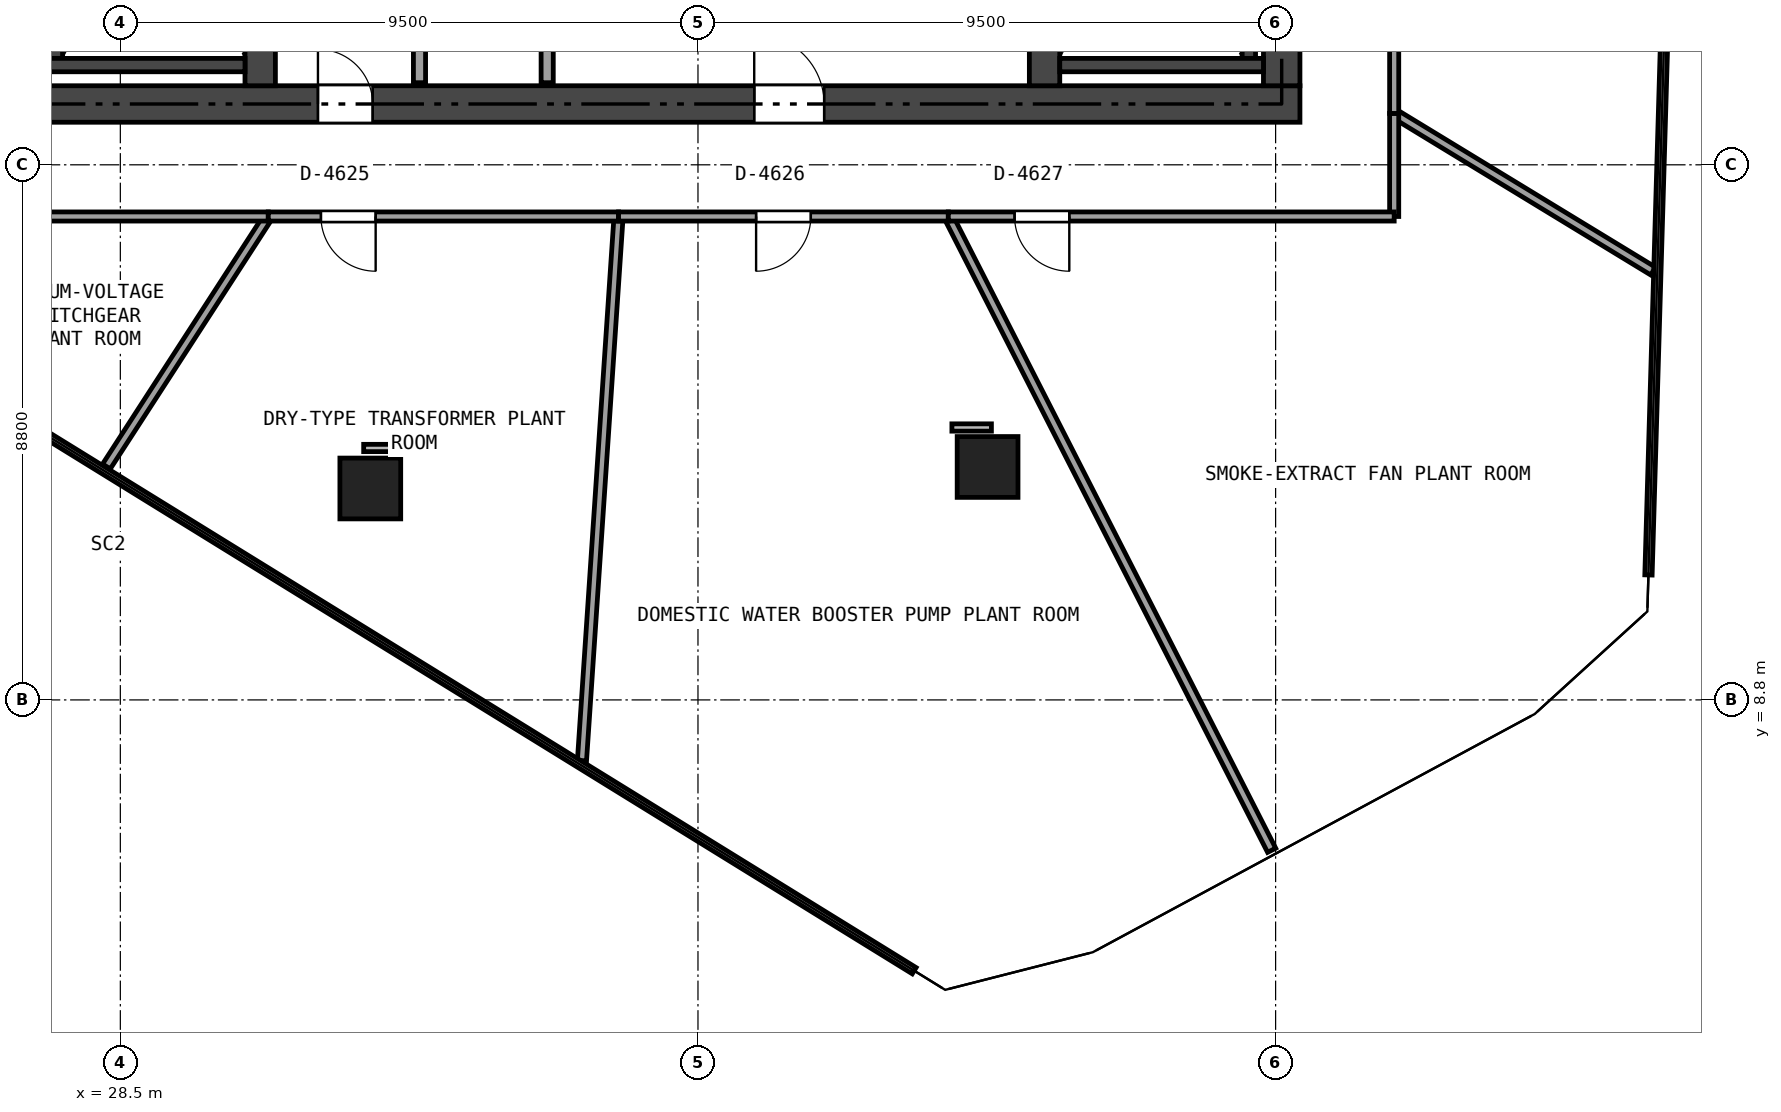
"""IFC4 building model, lengths in metres.
Left out: names, types, materials, properties, quantities, classifications, styles, units other than length and angle.
Written with IfcOpenShell. Run it as: python <this file> out.ifc"""

import sys

from ifc_helpers import new_model, si_unit, direction, frame, frame_2d, origin, origin_2d, place, context, subcontext, project, spatial, rectangle, extrude, element, fill, save


model = new_model("IFC4")
c1 = context("Model", 3, precision=1e-05, world=origin(), true_north=direction((0.0, 1.0)))
c2 = subcontext(c1, "Body", "Model", "MODEL_VIEW")
j1 = project(units=[si_unit("LENGTHUNIT", "METRE"), si_unit("PLANEANGLEUNIT", "RADIAN")], contexts=[c1])
p1 = place(None, origin())
s1 = spatial("IfcSite", under=j1, at=p1, CompositionType="ELEMENT")
p2 = place(p1, origin())
s2 = spatial("IfcBuilding", under=s1, at=p2, CompositionType="ELEMENT")
p3 = place(p2, frame((0.0, 0.0, 172.5)))
s3 = spatial("IfcBuildingStorey", under=s2, at=p3, CompositionType="ELEMENT", Elevation=172.5)
p4 = place(p3, frame((26.5, 18.6, 0.0), z_axis=(0.0, 0.0, 1.0), x_axis=(1.0, 0.0, 0.0)))
e1 = element("IfcWall", 1, at=p4, inside=s3, PredefinedType="SHEAR", context=c2, shape_type="SweptSolid", body=[
    extrude(rectangle(XDim=21.4, YDim=0.6, at=frame_2d((10.7, 0.0))), origin(), (0.0, 0.0, 1.0), 4.08),
])
p5 = place(p4, frame((12.425, 0.0, 0.0)))
e2 = element("IfcOpeningElement", 2, at=p5, cuts=e1, PredefinedType="OPENING", context=c2, shape_type="SweptSolid", body=[
    extrude(rectangle(XDim=1.15, YDim=2.15, at=frame_2d((0.575, 1.075))), frame((0.0, 0.31, 0.0), z_axis=(0.0, -1.0, 0.0), x_axis=(1.0, 0.0, 0.0)), (0.0, 0.0, 1.0), 0.62),
])
p6 = place(p4, frame((5.25, 0.0, 0.0)))
e3 = element("IfcOpeningElement", 3, at=p6, cuts=e1, PredefinedType="OPENING", context=c2, shape_type="SweptSolid", body=[
    extrude(rectangle(XDim=0.9, YDim=2.1, at=frame_2d((0.45, 1.05))), frame((0.0, 0.31, 0.0), z_axis=(0.0, -1.0, 0.0), x_axis=(1.0, 0.0, 0.0)), (0.0, 0.0, 1.0), 0.62),
])
p7 = place(p3, frame((47.6, 18.9, 0.0), z_axis=(0.0, 0.0, 1.0), x_axis=(0.0, 1.0, 0.0)))
e4 = element("IfcWall", 4, at=p7, inside=s3, PredefinedType="SHEAR", context=c2, shape_type="SweptSolid", body=[
    extrude(rectangle(XDim=15.0, YDim=0.6, at=frame_2d((7.5, 0.0))), origin(), (0.0, 0.0, 1.0), 4.08),
])
p8 = place(p7, frame((6.6, 0.0, 0.0)))
e5 = element("IfcOpeningElement", 5, at=p8, cuts=e4, PredefinedType="OPENING", context=c2, shape_type="SweptSolid", body=[
    extrude(rectangle(XDim=1.1, YDim=2.15, at=frame_2d((0.55, 1.075))), frame((0.0, 0.31, 0.0), z_axis=(0.0, -1.0, 0.0), x_axis=(1.0, 0.0, 0.0)), (0.0, 0.0, 1.0), 0.62),
])
p9 = place(p7, frame((8.5, 0.0, 0.0)))
e6 = element("IfcOpeningElement", 6, at=p9, cuts=e4, PredefinedType="OPENING", context=c2, shape_type="SweptSolid", body=[
    extrude(rectangle(XDim=0.9, YDim=2.1, at=frame_2d((0.45, 1.05))), frame((0.0, 0.31, 0.0), z_axis=(0.0, -1.0, 0.0), x_axis=(1.0, 0.0, 0.0)), (0.0, 0.0, 1.0), 0.62),
])
p10 = place(p7, frame((13.15, 0.0, 0.0)))
e7 = element("IfcOpeningElement", 7, at=p10, cuts=e4, PredefinedType="OPENING", context=c2, shape_type="SweptSolid", body=[
    extrude(rectangle(XDim=0.9, YDim=2.1, at=frame_2d((0.45, 1.05))), frame((0.0, 0.31, 0.0), z_axis=(0.0, -1.0, 0.0), x_axis=(1.0, 0.0, 0.0)), (0.0, 0.0, 1.0), 0.62),
])
p11 = place(p3, frame((30.8, 18.9, 0.0), z_axis=(0.0, 0.0, 1.0), x_axis=(0.0, 1.0, 0.0)))
e8 = element("IfcWall", 8, at=p11, inside=s3, PredefinedType="SHEAR", context=c2, shape_type="SweptSolid", body=[
    extrude(rectangle(XDim=15.0, YDim=0.5, at=frame_2d((7.5, 0.0))), origin(), (0.0, 0.0, 1.0), 4.08),
])
p12 = place(p11, frame((6.6, 0.0, 0.0)))
e9 = element("IfcOpeningElement", 9, at=p12, cuts=e8, PredefinedType="OPENING", context=c2, shape_type="SweptSolid", body=[
    extrude(rectangle(XDim=1.1, YDim=2.15, at=frame_2d((0.55, 1.075))), frame((0.0, 0.26, 0.0), z_axis=(0.0, -1.0, 0.0), x_axis=(1.0, 0.0, 0.0)), (0.0, 0.0, 1.0), 0.52),
])
p13 = place(p11, frame((8.4, 0.0, 0.0)))
e10 = element("IfcOpeningElement", 10, at=p13, cuts=e8, PredefinedType="OPENING", context=c2, shape_type="SweptSolid", body=[
    extrude(rectangle(XDim=0.9, YDim=2.1, at=frame_2d((0.45, 1.05))), frame((0.0, 0.26, 0.0), z_axis=(0.0, -1.0, 0.0), x_axis=(1.0, 0.0, 0.0)), (0.0, 0.0, 1.0), 0.52),
])
p14 = place(p3, frame((43.7, 18.9, 0.0), z_axis=(0.0, 0.0, 1.0), x_axis=(0.0, 1.0, 0.0)))
e11 = element("IfcWall", 11, at=p14, inside=s3, PredefinedType="SHEAR", context=c2, shape_type="SweptSolid", body=[
    extrude(rectangle(XDim=15.0, YDim=0.5, at=frame_2d((7.5, 0.0))), origin(), (0.0, 0.0, 1.0), 4.08),
])
p15 = place(p14, frame((8.1, 0.0, 0.0)))
e12 = element("IfcOpeningElement", 12, at=p15, cuts=e11, PredefinedType="OPENING", context=c2, shape_type="SweptSolid", body=[
    extrude(rectangle(XDim=0.9, YDim=2.1, at=frame_2d((0.45, 1.05))), frame((0.0, 0.26, 0.0), z_axis=(0.0, -1.0, 0.0), x_axis=(1.0, 0.0, 0.0)), (0.0, 0.0, 1.0), 0.52),
])
p16 = place(p3, frame((27.44, 19.35, 0.0), z_axis=(0.0, 0.0, 1.0), x_axis=(0.0, 1.0, 0.0)))
e13 = element("IfcWall", 13, at=p16, inside=s3, PredefinedType="SHEAR", context=c2, shape_type="SweptSolid", body=[
    extrude(rectangle(XDim=7.4, YDim=0.22, at=frame_2d((3.7, 0.0))), origin(), (0.0, 0.0, 1.0), 4.08),
])
p17 = place(p3, frame((27.1, 19.24, 0.0), z_axis=(0.0, 0.0, 1.0), x_axis=(1.0, 0.0, 0.0)))
e14 = element("IfcWall", 14, at=p17, inside=s3, PredefinedType="SHEAR", context=c2, shape_type="SweptSolid", body=[
    extrude(rectangle(XDim=3.45, YDim=0.22, at=frame_2d((1.725, 0.0))), origin(), (0.0, 0.0, 1.0), 4.08),
])
p18 = place(p3, frame((47.06, 19.35, 0.0), z_axis=(0.0, 0.0, 1.0), x_axis=(0.0, 1.0, 0.0)))
e15 = element("IfcWall", 15, at=p18, inside=s3, PredefinedType="SHEAR", context=c2, shape_type="SweptSolid", body=[
    extrude(rectangle(XDim=5.9, YDim=0.22, at=frame_2d((2.95, 0.0))), origin(), (0.0, 0.0, 1.0), 4.08),
])
p19 = place(p3, frame((43.95, 19.24, 0.0), z_axis=(0.0, 0.0, 1.0), x_axis=(1.0, 0.0, 0.0)))
e16 = element("IfcWall", 16, at=p19, inside=s3, PredefinedType="SHEAR", context=c2, shape_type="SweptSolid", body=[
    extrude(rectangle(XDim=3.35, YDim=0.22, at=frame_2d((1.675, 0.0))), origin(), (0.0, 0.0, 1.0), 4.08),
])
for number, where, z_axis, x_axis in (
    (17, (32.611, 12.277, 0.0), (0.0, 0.0, 1.0), (1.0, 0.0, 0.0)),
    (18, (42.763, 12.631, 0.0), (0.0, 0.0, 1.0), (1.0, 0.0, 0.0)),
):
    element("IfcColumn", number, at=place(p3, frame(where, z_axis=z_axis, x_axis=x_axis)), inside=s3, PredefinedType="COLUMN", context=c2, shape_type="SweptSolid", body=[
        extrude(rectangle(XDim=1.0, YDim=1.0, at=origin_2d()), origin(), (0.0, 0.0, 1.0), 4.08),
    ])
p20 = place(p3, frame((35.52, 18.95, 0.0), z_axis=(0.0, 0.0, 1.0), x_axis=(0.0, 1.0, 0.0)))
e19 = element("IfcWall", 19, at=p20, inside=s3, PredefinedType="SOLIDWALL", context=c2, shape_type="SweptSolid", body=[
    extrude(rectangle(XDim=14.9, YDim=0.2, at=frame_2d((7.45, 0.0))), origin(), (0.0, 0.0, 1.0), 3.601),
])
p21 = place(p20, frame((7.755, 0.0, 0.0)))
e20 = element("IfcOpeningElement", 20, at=p21, cuts=e19, PredefinedType="OPENING", context=c2, shape_type="SweptSolid", body=[
    extrude(rectangle(XDim=0.95, YDim=2.15, at=frame_2d((0.475, 1.075))), frame((0.0, 0.11, 0.0), z_axis=(0.0, -1.0, 0.0), x_axis=(1.0, 0.0, 0.0)), (0.0, 0.0, 1.0), 0.22),
])
p22 = place(p20, frame((0.6, 0.0, 0.0)))
e21 = element("IfcOpeningElement", 21, at=p22, cuts=e19, PredefinedType="OPENING", context=c2, shape_type="SweptSolid", body=[
    extrude(rectangle(XDim=0.9, YDim=2.1, at=frame_2d((0.45, 1.05))), frame((0.0, 0.11, 0.0), z_axis=(0.0, -1.0, 0.0), x_axis=(1.0, 0.0, 0.0)), (0.0, 0.0, 1.0), 0.22),
])
p23 = place(p3, frame((33.42, 18.95, 0.0), z_axis=(0.0, 0.0, 1.0), x_axis=(0.0, 1.0, 0.0)))
e22 = element("IfcWall", 22, at=p23, inside=s3, PredefinedType="SOLIDWALL", context=c2, shape_type="SweptSolid", body=[
    extrude(rectangle(XDim=6.13, YDim=0.2, at=frame_2d((3.065, 0.0))), origin(), (0.0, 0.0, 1.0), 3.601),
])
p24 = place(p3, frame((28.271, 12.639, 0.0), z_axis=(0.0, 0.0, 1.0), x_axis=(0.543538538902, 0.839384212818, 0.0)))
e23 = element("IfcWall", 23, at=p24, inside=s3, PredefinedType="PARTITIONING", context=c2, shape_type="SweptSolid", body=[
    extrude(rectangle(XDim=4.898, YDim=0.15, at=frame_2d((2.449, 0.0))), origin(), (0.0, 0.0, 1.0), 3.565),
])
p25 = place(p3, frame((30.933, 16.75, 0.0), z_axis=(0.0, 0.0, 1.0), x_axis=(-1.0, 0.0, 0.0)))
e24 = element("IfcWall", 24, at=p25, inside=s3, PredefinedType="PARTITIONING", context=c2, shape_type="SweptSolid", body=[
    extrude(rectangle(XDim=5.983, YDim=0.15, at=frame_2d((2.992, 0.0))), origin(), (0.0, 0.0, 1.0), 3.565),
])
p26 = place(p3, frame((36.092, 7.802, 0.0), z_axis=(0.0, 0.0, 1.0), x_axis=(0.067131511784, 0.997744135601, 0.0)))
e25 = element("IfcWall", 25, at=p26, inside=s3, PredefinedType="PARTITIONING", context=c2, shape_type="SweptSolid", body=[
    extrude(rectangle(XDim=8.968, YDim=0.15, at=frame_2d((4.484, 0.0))), origin(), (0.0, 0.0, 1.0), 3.565),
])
p27 = place(p3, frame((36.694, 16.75, 0.0), z_axis=(0.0, 0.0, 1.0), x_axis=(-1.0, 0.0, 0.0)))
e26 = element("IfcWall", 26, at=p27, inside=s3, PredefinedType="PARTITIONING", context=c2, shape_type="SweptSolid", body=[
    extrude(rectangle(XDim=5.761, YDim=0.15, at=frame_2d((2.88, 0.0))), origin(), (0.0, 0.0, 1.0), 3.065),
])
p28 = place(p27, frame((3.995, 0.0, 0.0)))
e27 = element("IfcOpeningElement", 27, at=p28, cuts=e26, PredefinedType="OPENING", context=c2, shape_type="SweptSolid", body=[
    extrude(rectangle(XDim=0.9, YDim=2.0, at=frame_2d((0.45, 1.0))), frame((0.0, 0.085, 0.0), z_axis=(0.0, -1.0, 0.0), x_axis=(1.0, 0.0, 0.0)), (0.0, 0.0, 1.0), 0.17),
])
p29 = place(p3, frame((47.435, 6.327, 0.0), z_axis=(0.0, 0.0, 1.0), x_axis=(-0.454484531482, 0.890754629875, 0.0)))
e28 = element("IfcWall", 28, at=p29, inside=s3, PredefinedType="PARTITIONING", context=c2, shape_type="SweptSolid", body=[
    extrude(rectangle(XDim=11.701, YDim=0.15, at=frame_2d((5.851, 0.0))), origin(), (0.0, 0.0, 1.0), 3.565),
])
p30 = place(p3, frame((42.117, 16.75, 0.0), z_axis=(0.0, 0.0, 1.0), x_axis=(-1.0, 0.0, 0.0)))
e29 = element("IfcWall", 29, at=p30, inside=s3, PredefinedType="PARTITIONING", context=c2, shape_type="SweptSolid", body=[
    extrude(rectangle(XDim=5.423, YDim=0.15, at=frame_2d((2.711, 0.0))), origin(), (0.0, 0.0, 1.0), 3.065),
])
p31 = place(p30, frame((2.261, 0.0, 0.0)))
e30 = element("IfcOpeningElement", 30, at=p31, cuts=e29, PredefinedType="OPENING", context=c2, shape_type="SweptSolid", body=[
    extrude(rectangle(XDim=0.9, YDim=2.0, at=frame_2d((0.45, 1.0))), frame((0.0, 0.085, 0.0), z_axis=(0.0, -1.0, 0.0), x_axis=(1.0, 0.0, 0.0)), (0.0, 0.0, 1.0), 0.17),
])
p32 = place(p3, frame((53.709, 15.852, 0.0), z_axis=(0.0, 0.0, 1.0), x_axis=(-0.8541484412, 0.520029268787, 0.0)))
e31 = element("IfcWall", 31, at=p32, inside=s3, PredefinedType="PARTITIONING", context=c2, shape_type="SweptSolid", body=[
    extrude(rectangle(XDim=4.986, YDim=0.15, at=frame_2d((2.493, 0.0))), origin(), (0.0, 0.0, 1.0), 4.08),
])
p33 = place(p3, frame((49.45, 18.445, 0.0), z_axis=(0.0, 0.0, 1.0), x_axis=(0.0, -1.0, 0.0)))
e32 = element("IfcWall", 32, at=p33, inside=s3, PredefinedType="PARTITIONING", context=c2, shape_type="SweptSolid", body=[
    extrude(rectangle(XDim=1.695, YDim=0.15, at=frame_2d((0.848, 0.0))), origin(), (0.0, 0.0, 1.0), 4.08),
])
p34 = place(p3, frame((49.45, 16.75, 0.0), z_axis=(0.0, 0.0, 1.0), x_axis=(-1.0, 0.0, 0.0)))
e33 = element("IfcWall", 33, at=p34, inside=s3, PredefinedType="PARTITIONING", context=c2, shape_type="SweptSolid", body=[
    extrude(rectangle(XDim=7.333, YDim=0.15, at=frame_2d((3.667, 0.0))), origin(), (0.0, 0.0, 1.0), 3.565),
])
p35 = place(p34, frame((5.343, 0.0, 0.0)))
e34 = element("IfcOpeningElement", 34, at=p35, cuts=e33, PredefinedType="OPENING", context=c2, shape_type="SweptSolid", body=[
    extrude(rectangle(XDim=0.9, YDim=2.0, at=frame_2d((0.45, 1.0))), frame((0.0, 0.085, 0.0), z_axis=(0.0, -1.0, 0.0), x_axis=(1.0, 0.0, 0.0)), (0.0, 0.0, 1.0), 0.17),
])
p36 = place(p3, frame((49.45, 25.758, 0.0), z_axis=(0.0, 0.0, 1.0), x_axis=(0.0, -1.0, 0.0)))
e35 = element("IfcWall", 35, at=p36, inside=s3, PredefinedType="PARTITIONING", context=c2, shape_type="SweptSolid", body=[
    extrude(rectangle(XDim=7.313, YDim=0.15, at=frame_2d((3.656, 0.0))), origin(), (0.0, 0.0, 1.0), 3.065),
])
p37 = place(p36, frame((2.359, 0.0, 0.0)))
e36 = element("IfcOpeningElement", 36, at=p37, cuts=e35, PredefinedType="OPENING", context=c2, shape_type="SweptSolid", body=[
    extrude(rectangle(XDim=0.9, YDim=2.0, at=frame_2d((0.45, 1.0))), frame((0.0, 0.085, 0.0), z_axis=(0.0, -1.0, 0.0), x_axis=(1.0, 0.0, 0.0)), (0.0, 0.0, 1.0), 0.17),
])
p38 = place(p5, origin())
e37 = element("IfcDoor", 37, at=p38, inside=s3, OperationType="SINGLE_SWING_LEFT", PredefinedType="DOOR", context=c2, shape_type="SweptSolid", body=[
    extrude(rectangle(XDim=1.15, YDim=2.15, at=frame_2d((0.575, 1.075))), frame((0.0, 0.025, 0.0), z_axis=(0.0, -1.0, 0.0), x_axis=(1.0, 0.0, 0.0)), (0.0, 0.0, 1.0), 0.05),
])
fill(e2, e37)
p39 = place(p6, origin())
e38 = element("IfcDoor", 38, at=p39, inside=s3, OperationType="SINGLE_SWING_LEFT", PredefinedType="DOOR", context=c2, shape_type="SweptSolid", body=[
    extrude(rectangle(XDim=0.9, YDim=2.1, at=frame_2d((0.45, 1.05))), frame((0.0, 0.025, 0.0), z_axis=(0.0, -1.0, 0.0), x_axis=(1.0, 0.0, 0.0)), (0.0, 0.0, 1.0), 0.05),
])
fill(e3, e38)
p40 = place(p28, origin())
e39 = element("IfcDoor", 39, at=p40, inside=s3, OperationType="SINGLE_SWING_LEFT", PredefinedType="DOOR", context=c2, shape_type="SweptSolid", body=[
    extrude(rectangle(XDim=0.9, YDim=2.0, at=frame_2d((0.45, 1.0))), frame((0.0, 0.025, 0.0), z_axis=(0.0, -1.0, 0.0), x_axis=(1.0, 0.0, 0.0)), (0.0, 0.0, 1.0), 0.05),
])
fill(e27, e39)
p41 = place(p31, origin())
e40 = element("IfcDoor", 40, at=p41, inside=s3, OperationType="SINGLE_SWING_RIGHT", PredefinedType="DOOR", context=c2, shape_type="SweptSolid", body=[
    extrude(rectangle(XDim=0.9, YDim=2.0, at=frame_2d((0.45, 1.0))), frame((0.0, 0.025, 0.0), z_axis=(0.0, -1.0, 0.0), x_axis=(1.0, 0.0, 0.0)), (0.0, 0.0, 1.0), 0.05),
])
fill(e30, e40)
p42 = place(p35, origin())
e41 = element("IfcDoor", 41, at=p42, inside=s3, OperationType="SINGLE_SWING_LEFT", PredefinedType="DOOR", context=c2, shape_type="SweptSolid", body=[
    extrude(rectangle(XDim=0.9, YDim=2.0, at=frame_2d((0.45, 1.0))), frame((0.0, 0.025, 0.0), z_axis=(0.0, -1.0, 0.0), x_axis=(1.0, 0.0, 0.0)), (0.0, 0.0, 1.0), 0.05),
])
fill(e34, e41)
save(model, sys.argv[1])
